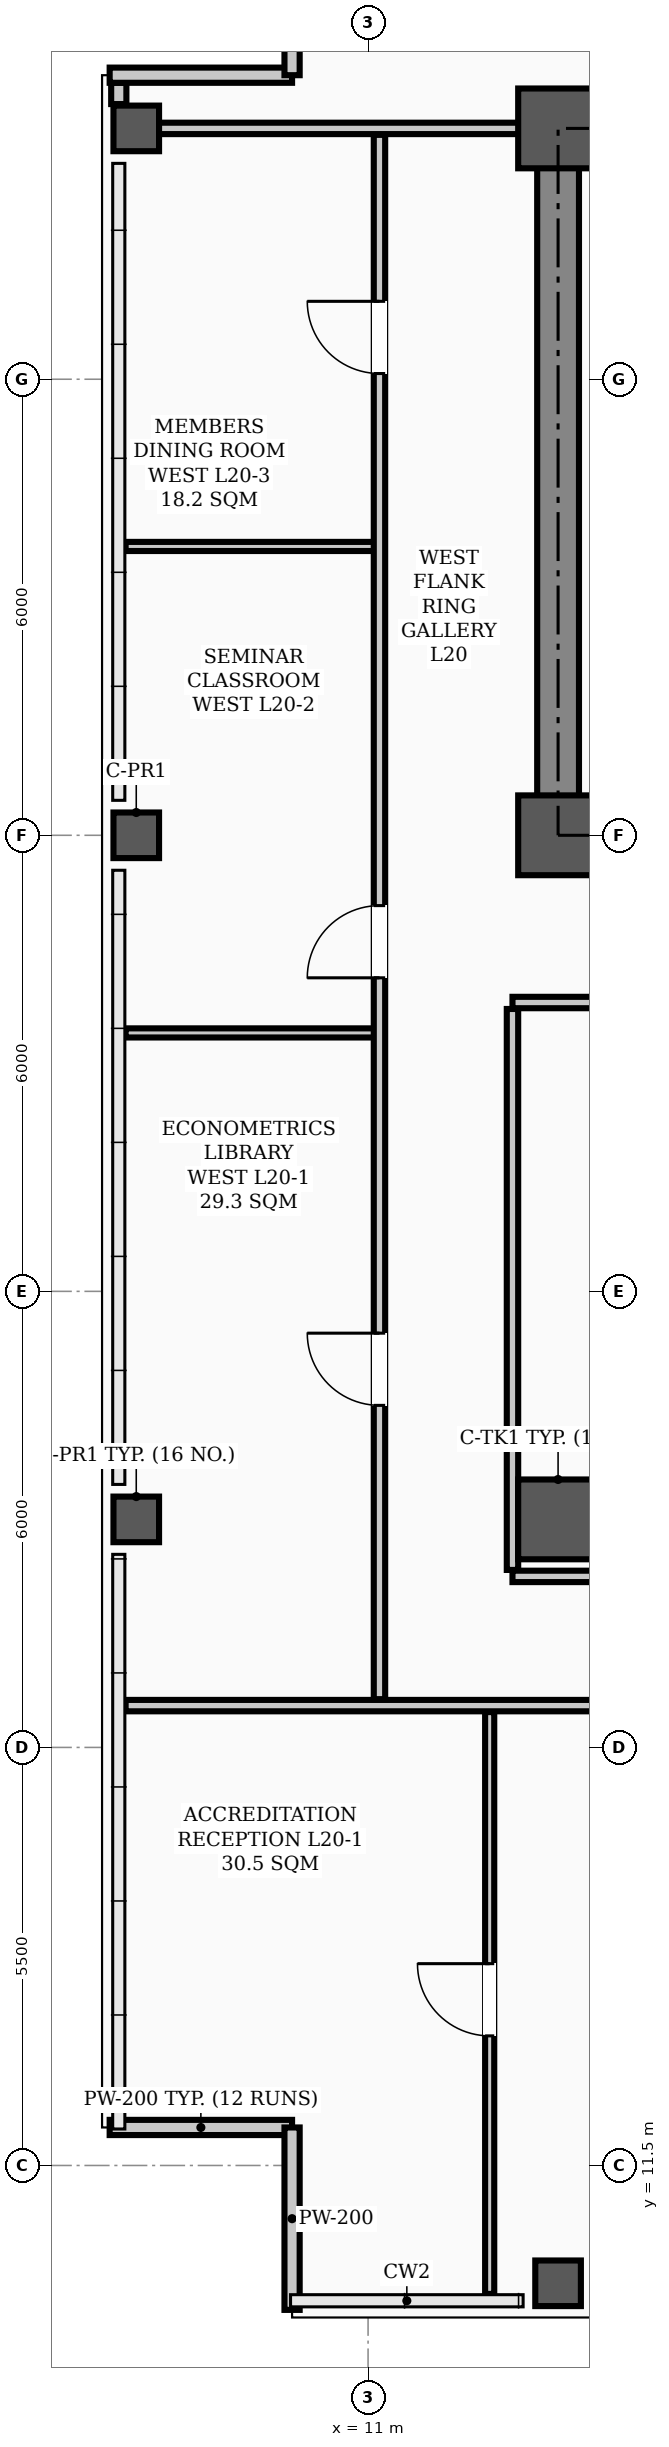
"""IFC4 building model, lengths in metres.
Left out: names, types, materials, properties, quantities, classifications, styles, units other than length and angle.
Written with IfcOpenShell. Run it as: python <this file> out.ifc"""

import sys

from ifc_helpers import new_model, si_unit, direction, frame, frame_2d, origin, origin_2d, place, context, subcontext, project, spatial, rectangle, hollow_rectangle, extrude, element, fill, save


model = new_model("IFC4")
c1 = context("Model", 3, precision=1e-05, world=origin(), true_north=direction((0.0, 1.0)))
c2 = subcontext(c1, "Body", "Model", "MODEL_VIEW")
j1 = project(units=[si_unit("LENGTHUNIT", "METRE"), si_unit("PLANEANGLEUNIT", "RADIAN")], contexts=[c1])
p1 = place(None, origin())
s1 = spatial("IfcSite", under=j1, at=p1, CompositionType="ELEMENT")
p2 = place(p1, origin())
s2 = spatial("IfcBuilding", under=s1, at=p2, CompositionType="ELEMENT")
p3 = place(p2, frame((0.0, 0.0, 81.1)))
s3 = spatial("IfcBuildingStorey", under=s2, at=p3, CompositionType="ELEMENT", Elevation=81.1)
for number, where, z_axis, x_axis in (
    (1, (13.5, 29.0, 0.0), (0.0, 0.0, 1.0), (1.0, 0.0, 0.0)),
    (2, (13.5, 38.3, 0.0), (0.0, 0.0, 1.0), (1.0, 0.0, 0.0)),
    (3, (13.5, 20.0, 0.0), (0.0, 0.0, 1.0), (1.0, 0.0, 0.0)),
):
    element("IfcColumn", number, at=place(p3, frame(where, z_axis=z_axis, x_axis=x_axis)), inside=s3, PredefinedType="COLUMN", context=c2, shape_type="SweptSolid", body=[
        extrude(hollow_rectangle(XDim=1.05, YDim=1.05, WallThickness=0.038, InnerFilletRadius=0.019, OuterFilletRadius=0.057, at=origin_2d()), origin(), (0.0, 0.0, 1.0), 3.9),
    ])
for number, where, z_axis, x_axis in (
    (4, (7.95, 20.0, 0.0), (0.0, 0.0, 1.0), (1.0, 0.0, 0.0)),
    (5, (7.95, 29.0, 0.0), (0.0, 0.0, 1.0), (1.0, 0.0, 0.0)),
    (6, (7.95, 38.3, 0.0), (0.0, 0.0, 1.0), (1.0, 0.0, 0.0)),
    (7, (13.5, 9.95, 0.0), (0.0, 0.0, 1.0), (1.0, 0.0, 0.0)),
):
    element("IfcColumn", number, at=place(p3, frame(where, z_axis=z_axis, x_axis=x_axis)), inside=s3, PredefinedType="COLUMN", context=c2, shape_type="SweptSolid", body=[
        extrude(hollow_rectangle(XDim=0.6, YDim=0.6, WallThickness=0.026, InnerFilletRadius=0.013, OuterFilletRadius=0.039, at=origin_2d()), origin(), (0.0, 0.0, 1.0), 3.9),
    ])
p4 = place(p3, frame((7.72, 38.62, 0.0), z_axis=(0.0, 0.0, 1.0), x_axis=(0.0, 1.0, 0.0)))
e8 = element("IfcWall", 8, at=p4, inside=s3, PredefinedType="PARAPET", context=c2, shape_type="SweptSolid", body=[
    extrude(rectangle(XDim=0.28, YDim=0.2, at=frame_2d((0.14, 0.0))), origin(), (0.0, 0.0, 1.0), 1.2),
])
for number, where, z_axis, x_axis in (
    (9, (7.6, 12.0, 0.0), (0.0, 0.0, 1.0), (1.0, 0.0, 0.0)),
    (10, (10.0, 12.0, 0.0), (0.0, 0.0, 1.0), (0.0, -1.0, 0.0)),
    (11, (7.6, 39.0, 0.0), (0.0, 0.0, 1.0), (1.0, 0.0, 0.0)),
    (12, (10.0, 39.0, 0.0), (0.0, 0.0, 1.0), (0.0, 1.0, 0.0)),
):
    element("IfcWall", number, at=place(p3, frame(where, z_axis=z_axis, x_axis=x_axis)), inside=s3, PredefinedType="PARAPET", context=c2, shape_type="SweptSolid", body=[
        extrude(rectangle(XDim=2.4, YDim=0.2, at=frame_2d((1.2, 0.0))), origin(), (0.0, 0.0, 1.0), 1.2),
    ])
p5 = place(p3, frame((13.5, 29.0, 0.0), z_axis=(0.0, 0.0, 1.0), x_axis=(1.0, 0.0, 0.0)))
e13 = element("IfcWall", 13, at=p5, inside=s3, PredefinedType="SHEAR", context=c2, shape_type="SweptSolid", body=[
    extrude(rectangle(XDim=30.5, YDim=0.55, at=frame_2d((15.25, 0.0))), origin(), (0.0, 0.0, 1.0), 3.72),
])
p6 = place(p5, frame((1.75, 0.0, 0.0)))
e14 = element("IfcOpeningElement", 14, at=p6, cuts=e13, PredefinedType="OPENING", context=c2, shape_type="SweptSolid", body=[
    extrude(rectangle(XDim=1.1, YDim=2.08, at=frame_2d((0.55, 1.04))), frame((0.0, 0.285, 0.0), z_axis=(0.0, -1.0, 0.0), x_axis=(1.0, 0.0, 0.0)), (0.0, 0.0, 1.0), 0.57),
])
p7 = place(p5, frame((26.7, 0.0, 0.0)))
e15 = element("IfcOpeningElement", 15, at=p7, cuts=e13, PredefinedType="OPENING", context=c2, shape_type="SweptSolid", body=[
    extrude(rectangle(XDim=1.1, YDim=2.08, at=frame_2d((0.55, 1.04))), frame((0.0, 0.285, 0.0), z_axis=(0.0, -1.0, 0.0), x_axis=(1.0, 0.0, 0.0)), (0.0, 0.0, 1.0), 0.57),
])
p8 = place(p5, frame((6.8, 0.0, 0.0)))
e16 = element("IfcOpeningElement", 16, at=p8, cuts=e13, PredefinedType="OPENING", context=c2, shape_type="SweptSolid", body=[
    extrude(rectangle(XDim=1.1, YDim=2.08, at=frame_2d((0.55, 1.04))), frame((0.0, 0.285, 0.0), z_axis=(0.0, -1.0, 0.0), x_axis=(1.0, 0.0, 0.0)), (0.0, 0.0, 1.0), 0.57),
])
p9 = place(p5, frame((13.2, 0.0, 0.0)))
e17 = element("IfcOpeningElement", 17, at=p9, cuts=e13, PredefinedType="OPENING", context=c2, shape_type="SweptSolid", body=[
    extrude(rectangle(XDim=1.6, YDim=2.08, at=frame_2d((0.8, 1.04))), frame((0.0, 0.285, 0.0), z_axis=(0.0, -1.0, 0.0), x_axis=(1.0, 0.0, 0.0)), (0.0, 0.0, 1.0), 0.57),
])
p10 = place(p5, frame((19.53, 0.0, 0.0)))
e18 = element("IfcOpeningElement", 18, at=p10, cuts=e13, PredefinedType="OPENING", context=c2, shape_type="SweptSolid", body=[
    extrude(rectangle(XDim=0.9, YDim=2.08, at=frame_2d((0.45, 1.04))), frame((0.0, 0.285, 0.0), z_axis=(0.0, -1.0, 0.0), x_axis=(1.0, 0.0, 0.0)), (0.0, 0.0, 1.0), 0.57),
])
p11 = place(p5, frame((21.57, 0.0, 0.0)))
e19 = element("IfcOpeningElement", 19, at=p11, cuts=e13, PredefinedType="OPENING", context=c2, shape_type="SweptSolid", body=[
    extrude(rectangle(XDim=0.9, YDim=2.08, at=frame_2d((0.45, 1.04))), frame((0.0, 0.285, 0.0), z_axis=(0.0, -1.0, 0.0), x_axis=(1.0, 0.0, 0.0)), (0.0, 0.0, 1.0), 0.57),
])
p12 = place(p3, frame((13.5, 38.3, 0.0), z_axis=(0.0, 0.0, 1.0), x_axis=(1.0, 0.0, 0.0)))
e20 = element("IfcWall", 20, at=p12, inside=s3, PredefinedType="SHEAR", context=c2, shape_type="SweptSolid", body=[
    extrude(rectangle(XDim=30.5, YDim=0.55, at=frame_2d((15.25, 0.0))), origin(), (0.0, 0.0, 1.0), 3.72),
])
p13 = place(p3, frame((13.5, 29.35, 0.0), z_axis=(0.0, 0.0, 1.0), x_axis=(0.0, 1.0, 0.0)))
e21 = element("IfcWall", 21, at=p13, inside=s3, PredefinedType="SHEAR", context=c2, shape_type="SweptSolid", body=[
    extrude(rectangle(XDim=8.6, YDim=0.55, at=frame_2d((4.3, 0.0))), origin(), (0.0, 0.0, 1.0), 3.72),
])
p14 = place(p3, frame((12.9, 26.8, 0.0), z_axis=(0.0, 0.0, 1.0), x_axis=(1.0, 0.0, 0.0)))
e22 = element("IfcWall", 22, at=p14, inside=s3, PredefinedType="PARTITIONING", context=c2, shape_type="SweptSolid", body=[
    extrude(rectangle(XDim=31.7, YDim=0.15, at=frame_2d((15.85, 0.0))), origin(), (0.0, 0.0, 1.0), 3.1),
])
p15 = place(p14, frame((13.6, 0.0, 0.0)))
e23 = element("IfcOpeningElement", 23, at=p15, cuts=e22, PredefinedType="OPENING", context=c2, shape_type="SweptSolid", body=[
    extrude(rectangle(XDim=1.6, YDim=2.08, at=frame_2d((0.8, 1.04))), frame((0.0, 0.085, 0.0), z_axis=(0.0, -1.0, 0.0), x_axis=(1.0, 0.0, 0.0)), (0.0, 0.0, 1.0), 0.17),
])
p16 = place(p14, frame((1.875, 0.0, 0.0)))
e24 = element("IfcOpeningElement", 24, at=p16, cuts=e22, PredefinedType="OPENING", context=c2, shape_type="SweptSolid", body=[
    extrude(rectangle(XDim=0.95, YDim=2.08, at=frame_2d((0.475, 1.04))), frame((0.0, 0.085, 0.0), z_axis=(0.0, -1.0, 0.0), x_axis=(1.0, 0.0, 0.0)), (0.0, 0.0, 1.0), 0.17),
])
p17 = place(p14, frame((6.425, 0.0, 0.0)))
e25 = element("IfcOpeningElement", 25, at=p17, cuts=e22, PredefinedType="OPENING", context=c2, shape_type="SweptSolid", body=[
    extrude(rectangle(XDim=0.95, YDim=2.08, at=frame_2d((0.475, 1.04))), frame((0.0, 0.085, 0.0), z_axis=(0.0, -1.0, 0.0), x_axis=(1.0, 0.0, 0.0)), (0.0, 0.0, 1.0), 0.17),
])
p18 = place(p14, frame((10.725, 0.0, 0.0)))
e26 = element("IfcOpeningElement", 26, at=p18, cuts=e22, PredefinedType="OPENING", context=c2, shape_type="SweptSolid", body=[
    extrude(rectangle(XDim=0.95, YDim=2.08, at=frame_2d((0.475, 1.04))), frame((0.0, 0.085, 0.0), z_axis=(0.0, -1.0, 0.0), x_axis=(1.0, 0.0, 0.0)), (0.0, 0.0, 1.0), 0.17),
])
p19 = place(p14, frame((16.075, 0.0, 0.0)))
e27 = element("IfcOpeningElement", 27, at=p19, cuts=e22, PredefinedType="OPENING", context=c2, shape_type="SweptSolid", body=[
    extrude(rectangle(XDim=0.95, YDim=2.08, at=frame_2d((0.475, 1.04))), frame((0.0, 0.085, 0.0), z_axis=(0.0, -1.0, 0.0), x_axis=(1.0, 0.0, 0.0)), (0.0, 0.0, 1.0), 0.17),
])
p20 = place(p14, frame((22.225, 0.0, 0.0)))
e28 = element("IfcOpeningElement", 28, at=p20, cuts=e22, PredefinedType="OPENING", context=c2, shape_type="SweptSolid", body=[
    extrude(rectangle(XDim=0.95, YDim=2.08, at=frame_2d((0.475, 1.04))), frame((0.0, 0.085, 0.0), z_axis=(0.0, -1.0, 0.0), x_axis=(1.0, 0.0, 0.0)), (0.0, 0.0, 1.0), 0.17),
])
p21 = place(p14, frame((28.225, 0.0, 0.0)))
e29 = element("IfcOpeningElement", 29, at=p21, cuts=e22, PredefinedType="OPENING", context=c2, shape_type="SweptSolid", body=[
    extrude(rectangle(XDim=0.95, YDim=2.08, at=frame_2d((0.475, 1.04))), frame((0.0, 0.085, 0.0), z_axis=(0.0, -1.0, 0.0), x_axis=(1.0, 0.0, 0.0)), (0.0, 0.0, 1.0), 0.17),
])
p22 = place(p3, frame((7.81, 17.55, 0.0), z_axis=(0.0, 0.0, 1.0), x_axis=(1.0, 0.0, 0.0)))
e30 = element("IfcWall", 30, at=p22, inside=s3, PredefinedType="PARTITIONING", context=c2, shape_type="SweptSolid", body=[
    extrude(rectangle(XDim=49.38, YDim=0.15, at=frame_2d((24.69, 0.0))), origin(), (0.0, 0.0, 1.0), 3.1),
])
p23 = place(p22, frame((7.815, 0.0, 0.0)))
e31 = element("IfcOpeningElement", 31, at=p23, cuts=e30, PredefinedType="OPENING", context=c2, shape_type="SweptSolid", body=[
    extrude(rectangle(XDim=0.95, YDim=2.08, at=frame_2d((0.475, 1.04))), frame((0.0, 0.085, 0.0), z_axis=(0.0, -1.0, 0.0), x_axis=(1.0, 0.0, 0.0)), (0.0, 0.0, 1.0), 0.17),
])
p24 = place(p22, frame((13.815, 0.0, 0.0)))
e32 = element("IfcOpeningElement", 32, at=p24, cuts=e30, PredefinedType="OPENING", context=c2, shape_type="SweptSolid", body=[
    extrude(rectangle(XDim=0.95, YDim=2.08, at=frame_2d((0.475, 1.04))), frame((0.0, 0.085, 0.0), z_axis=(0.0, -1.0, 0.0), x_axis=(1.0, 0.0, 0.0)), (0.0, 0.0, 1.0), 0.17),
])
p25 = place(p22, frame((20.715, 0.0, 0.0)))
e33 = element("IfcOpeningElement", 33, at=p25, cuts=e30, PredefinedType="OPENING", context=c2, shape_type="SweptSolid", body=[
    extrude(rectangle(XDim=0.95, YDim=2.08, at=frame_2d((0.475, 1.04))), frame((0.0, 0.085, 0.0), z_axis=(0.0, -1.0, 0.0), x_axis=(1.0, 0.0, 0.0)), (0.0, 0.0, 1.0), 0.17),
])
p26 = place(p22, frame((30.915, 0.0, 0.0)))
e34 = element("IfcOpeningElement", 34, at=p26, cuts=e30, PredefinedType="OPENING", context=c2, shape_type="SweptSolid", body=[
    extrude(rectangle(XDim=0.95, YDim=2.08, at=frame_2d((0.475, 1.04))), frame((0.0, 0.085, 0.0), z_axis=(0.0, -1.0, 0.0), x_axis=(1.0, 0.0, 0.0)), (0.0, 0.0, 1.0), 0.17),
])
p27 = place(p22, frame((36.49, 0.0, 0.0)))
e35 = element("IfcOpeningElement", 35, at=p27, cuts=e30, PredefinedType="OPENING", context=c2, shape_type="SweptSolid", body=[
    extrude(rectangle(XDim=0.95, YDim=2.08, at=frame_2d((0.475, 1.04))), frame((0.0, 0.085, 0.0), z_axis=(0.0, -1.0, 0.0), x_axis=(1.0, 0.0, 0.0)), (0.0, 0.0, 1.0), 0.17),
])
p28 = place(p3, frame((12.9, 19.25, 0.0), z_axis=(0.0, 0.0, 1.0), x_axis=(1.0, 0.0, 0.0)))
e36 = element("IfcWall", 36, at=p28, inside=s3, PredefinedType="PARTITIONING", context=c2, shape_type="SweptSolid", body=[
    extrude(rectangle(XDim=13.3, YDim=0.15, at=frame_2d((6.65, 0.0))), origin(), (0.0, 0.0, 1.0), 3.1),
])
p29 = place(p3, frame((7.81, 38.3, 0.0), z_axis=(0.0, 0.0, 1.0), x_axis=(1.0, 0.0, 0.0)))
e37 = element("IfcWall", 37, at=p29, inside=s3, PredefinedType="PARTITIONING", context=c2, shape_type="SweptSolid", body=[
    extrude(rectangle(XDim=5.69, YDim=0.15, at=frame_2d((2.845, 0.0))), origin(), (0.0, 0.0, 1.0), 3.0),
])
for number, where, z_axis, x_axis in (
    (38, (7.81, 26.4, 0.0), (0.0, 0.0, 1.0), (1.0, 0.0, 0.0)),
    (39, (7.81, 32.8, 0.0), (0.0, 0.0, 1.0), (1.0, 0.0, 0.0)),
):
    element("IfcWall", number, at=place(p3, frame(where, z_axis=z_axis, x_axis=x_axis)), inside=s3, PredefinedType="PARTITIONING", context=c2, shape_type="SweptSolid", body=[
        extrude(rectangle(XDim=3.34, YDim=0.12, at=frame_2d((1.67, 0.0))), origin(), (0.0, 0.0, 1.0), 3.212),
    ])
p30 = place(p3, frame((11.15, 17.635, 0.0), z_axis=(0.0, 0.0, 1.0), x_axis=(0.0, 1.0, 0.0)))
e40 = element("IfcWall", 40, at=p30, inside=s3, PredefinedType="PARTITIONING", context=c2, shape_type="SweptSolid", body=[
    extrude(rectangle(XDim=20.58, YDim=0.15, at=frame_2d((10.29, 0.0))), origin(), (0.0, 0.0, 1.0), 3.0),
])
p31 = place(p30, frame((3.865, 0.0, 0.0)))
e41 = element("IfcOpeningElement", 41, at=p31, cuts=e40, PredefinedType="OPENING", context=c2, shape_type="SweptSolid", body=[
    extrude(rectangle(XDim=0.95, YDim=2.08, at=frame_2d((0.475, 1.04))), frame((0.0, 0.085, 0.0), z_axis=(0.0, -1.0, 0.0), x_axis=(1.0, 0.0, 0.0)), (0.0, 0.0, 1.0), 0.17),
])
p32 = place(p30, frame((9.49, 0.0, 0.0)))
e42 = element("IfcOpeningElement", 42, at=p32, cuts=e40, PredefinedType="OPENING", context=c2, shape_type="SweptSolid", body=[
    extrude(rectangle(XDim=0.95, YDim=2.08, at=frame_2d((0.475, 1.04))), frame((0.0, 0.085, 0.0), z_axis=(0.0, -1.0, 0.0), x_axis=(1.0, 0.0, 0.0)), (0.0, 0.0, 1.0), 0.17),
])
p33 = place(p30, frame((17.44, 0.0, 0.0)))
e43 = element("IfcOpeningElement", 43, at=p33, cuts=e40, PredefinedType="OPENING", context=c2, shape_type="SweptSolid", body=[
    extrude(rectangle(XDim=0.95, YDim=2.08, at=frame_2d((0.475, 1.04))), frame((0.0, 0.085, 0.0), z_axis=(0.0, -1.0, 0.0), x_axis=(1.0, 0.0, 0.0)), (0.0, 0.0, 1.0), 0.17),
])
p34 = place(p3, frame((12.9, 19.335, 0.0), z_axis=(0.0, 0.0, 1.0), x_axis=(0.0, 1.0, 0.0)))
e44 = element("IfcWall", 44, at=p34, inside=s3, PredefinedType="PARTITIONING", context=c2, shape_type="SweptSolid", body=[
    extrude(rectangle(XDim=7.38, YDim=0.15, at=frame_2d((3.69, 0.0))), origin(), (0.0, 0.0, 1.0), 3.0),
])
p35 = place(p3, frame((12.6, 9.81, 0.0), z_axis=(0.0, 0.0, 1.0), x_axis=(0.0, 1.0, 0.0)))
e45 = element("IfcWall", 45, at=p35, inside=s3, PredefinedType="PARTITIONING", context=c2, shape_type="SweptSolid", body=[
    extrude(rectangle(XDim=7.655, YDim=0.12, at=frame_2d((3.828, 0.0))), origin(), (0.0, 0.0, 1.0), 3.72),
])
p36 = place(p35, frame((3.395, 0.0, 0.0)))
e46 = element("IfcOpeningElement", 46, at=p36, cuts=e45, PredefinedType="OPENING", context=c2, shape_type="SweptSolid", body=[
    extrude(rectangle(XDim=0.95, YDim=2.08, at=frame_2d((0.475, 1.04))), frame((0.0, 0.07, 0.0), z_axis=(0.0, -1.0, 0.0), x_axis=(1.0, 0.0, 0.0)), (0.0, 0.0, 1.0), 0.14),
])
p37 = place(p36, origin())
e47 = element("IfcDoor", 47, at=p37, inside=s3, OperationType="SINGLE_SWING_RIGHT", PredefinedType="DOOR", context=c2, shape_type="SweptSolid", body=[
    extrude(rectangle(XDim=0.95, YDim=2.08, at=frame_2d((0.475, 1.04))), frame((0.0, 0.025, 0.0), z_axis=(0.0, -1.0, 0.0), x_axis=(1.0, 0.0, 0.0)), (0.0, 0.0, 1.0), 0.05),
])
fill(e46, e47)
p38 = place(p31, origin())
e48 = element("IfcDoor", 48, at=p38, inside=s3, OperationType="SINGLE_SWING_RIGHT", PredefinedType="DOOR", context=c2, shape_type="SweptSolid", body=[
    extrude(rectangle(XDim=0.95, YDim=2.08, at=frame_2d((0.475, 1.04))), frame((0.0, 0.025, 0.0), z_axis=(0.0, -1.0, 0.0), x_axis=(1.0, 0.0, 0.0)), (0.0, 0.0, 1.0), 0.05),
])
fill(e41, e48)
p39 = place(p32, origin())
e49 = element("IfcDoor", 49, at=p39, inside=s3, OperationType="SINGLE_SWING_LEFT", PredefinedType="DOOR", context=c2, shape_type="SweptSolid", body=[
    extrude(rectangle(XDim=0.95, YDim=2.08, at=frame_2d((0.475, 1.04))), frame((0.0, 0.025, 0.0), z_axis=(0.0, -1.0, 0.0), x_axis=(1.0, 0.0, 0.0)), (0.0, 0.0, 1.0), 0.05),
])
fill(e42, e49)
p40 = place(p33, origin())
e50 = element("IfcDoor", 50, at=p40, inside=s3, OperationType="SINGLE_SWING_RIGHT", PredefinedType="DOOR", context=c2, shape_type="SweptSolid", body=[
    extrude(rectangle(XDim=0.95, YDim=2.08, at=frame_2d((0.475, 1.04))), frame((0.0, 0.025, 0.0), z_axis=(0.0, -1.0, 0.0), x_axis=(1.0, 0.0, 0.0)), (0.0, 0.0, 1.0), 0.05),
])
fill(e43, e50)
save(model, sys.argv[1])
